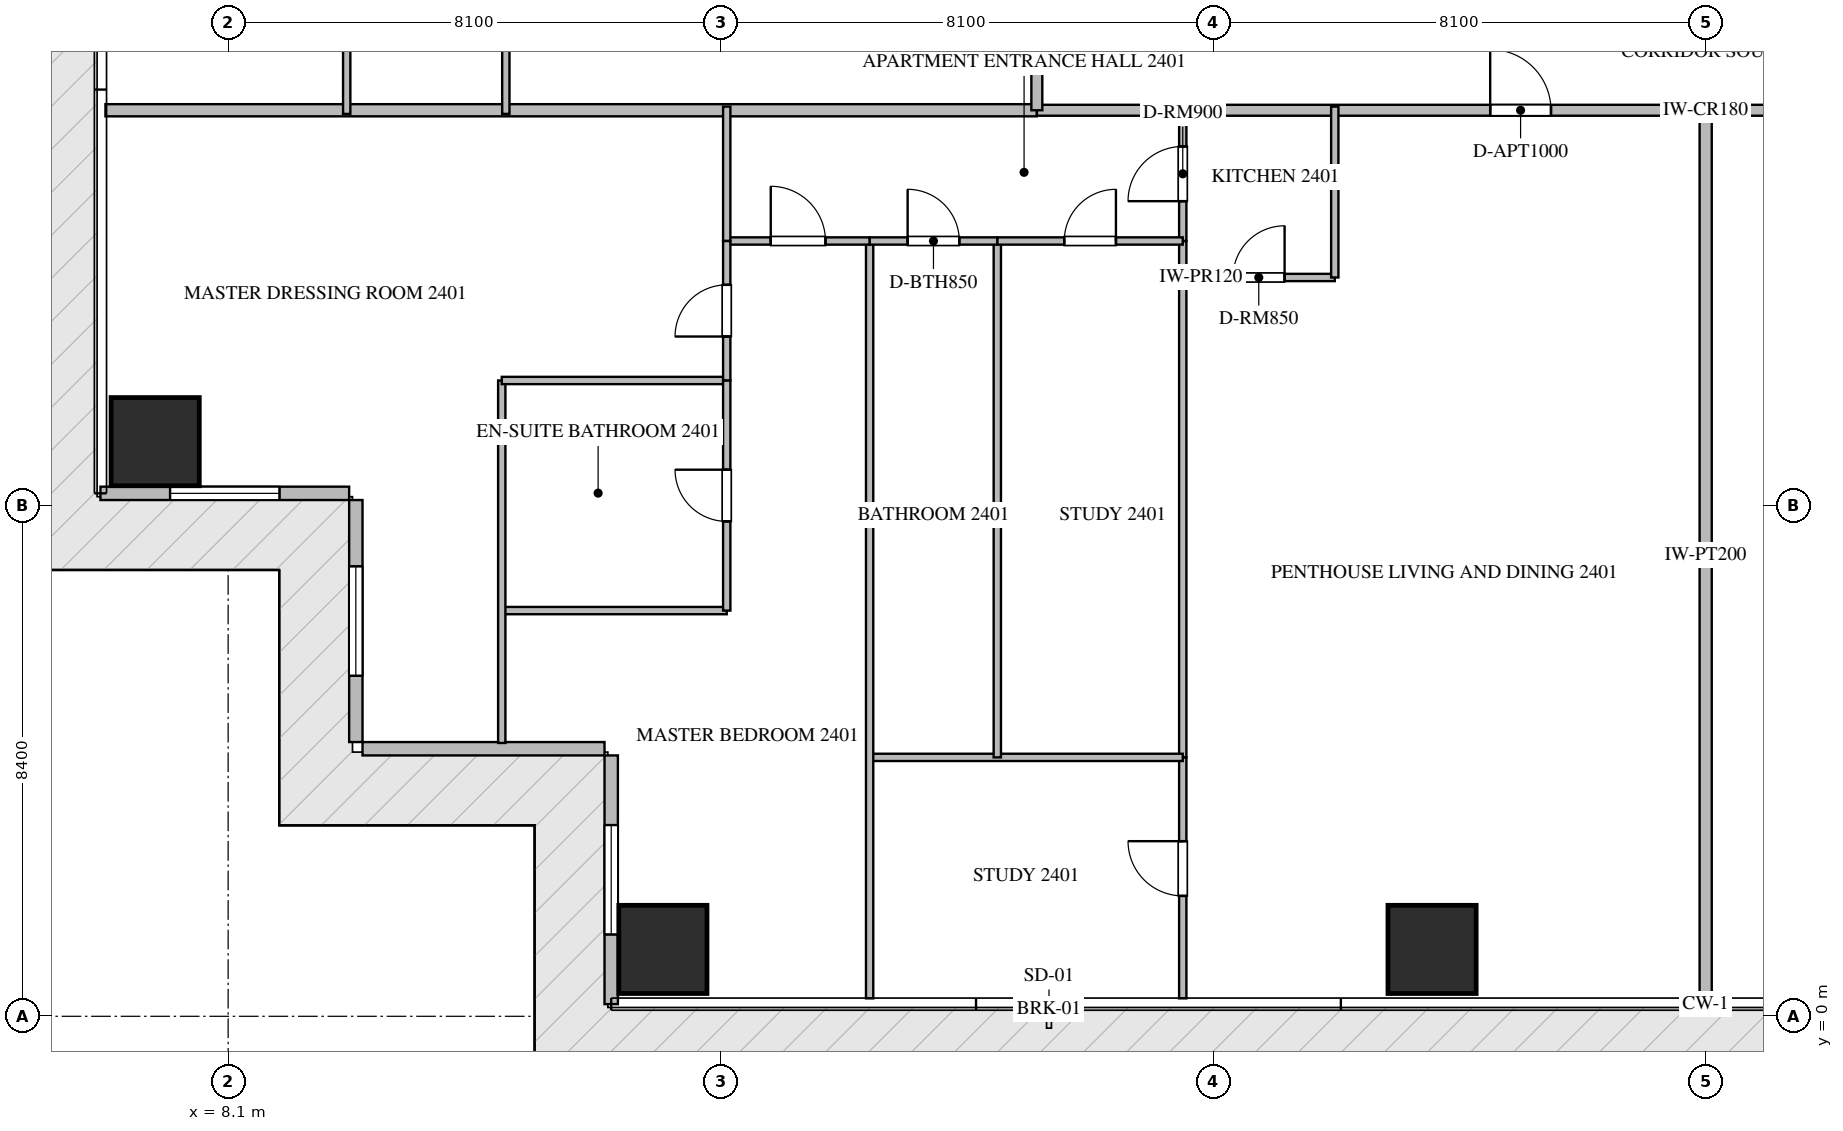
"""IFC4 building model, lengths in metres.
Left out: names, types, materials, properties, quantities, classifications, styles, units other than length and angle.
Written with IfcOpenShell. Run it as: python <this file> out.ifc"""

import sys

from ifc_helpers import new_model, si_unit, direction, frame, frame_2d, origin, origin_2d, place, context, subcontext, project, spatial, rectangle, extrude, source, transform, mapped, element, fill, save


model = new_model("IFC4")
c1 = context("Model", 3, precision=1e-05, world=origin(), true_north=direction((0.0, 1.0)))
c2 = subcontext(c1, "Body", "Model", "MODEL_VIEW")
j1 = project(units=[si_unit("LENGTHUNIT", "METRE"), si_unit("PLANEANGLEUNIT", "RADIAN")], contexts=[c1])
p1 = place(None, origin())
s1 = spatial("IfcSite", under=j1, at=p1, CompositionType="ELEMENT")
p2 = place(p1, origin())
s2 = spatial("IfcBuilding", under=s1, at=p2, CompositionType="ELEMENT")
p3 = place(p2, frame((0.0, 0.0, 97.95)))
s3 = spatial("IfcBuildingStorey", under=s2, at=p3, CompositionType="ELEMENT", Elevation=97.95)
m1 = source(origin(), c2, "Body", "SweptSolid", [
    extrude(rectangle(XDim=1.45, YDim=1.45, at=origin_2d()), origin(), (0.0, 0.0, 1.0), 3.75),
])
for number, where, z_axis, x_axis in (
    (1, (15.25, 1.1, -0.26), (0.0, 0.0, 1.0), (1.0, 0.0, 0.0)),
    (2, (27.9, 1.1, -0.26), (0.0, 0.0, 1.0), (1.0, 0.0, 0.0)),
    (3, (6.9, 9.45, -0.26), (0.0, 0.0, 1.0), (1.0, 0.0, 0.0)),
):
    element("IfcColumn", number, at=place(p3, frame(where, z_axis=z_axis, x_axis=x_axis)), inside=s3, PredefinedType="COLUMN", context=c2, shape_type="MappedRepresentation", body=[
        mapped(m1, transform((0.0, 0.0, 0.0), scale=1.0)),
    ])
p4 = place(p3, frame((6.0, 8.6, 0.0), z_axis=(0.0, 0.0, 1.0), x_axis=(1.0, 0.0, 0.0)))
e4 = element("IfcWall", 4, at=p4, inside=s3, PredefinedType="ELEMENTEDWALL", context=c2, shape_type="SweptSolid", body=[
    extrude(rectangle(XDim=4.09, YDim=0.22, at=frame_2d((2.045, 0.0))), origin(), (0.0, 0.0, 1.0), 3.475),
])
p5 = place(p4, frame((1.145, 0.0, 0.65)))
e5 = element("IfcOpeningElement", 5, at=p5, cuts=e4, PredefinedType="OPENING", context=c2, shape_type="SweptSolid", body=[
    extrude(rectangle(XDim=1.8, YDim=2.1, at=frame_2d((0.9, 1.05))), frame((0.0, 0.12, 0.0), z_axis=(0.0, -1.0, 0.0), x_axis=(1.0, 0.0, 0.0)), (0.0, 0.0, 1.0), 0.24),
])
p6 = place(p3, frame((10.2, 8.49, 0.0), z_axis=(0.0, 0.0, 1.0), x_axis=(0.0, -1.0, 0.0)))
e6 = element("IfcWall", 6, at=p6, inside=s3, PredefinedType="ELEMENTEDWALL", context=c2, shape_type="SweptSolid", body=[
    extrude(rectangle(XDim=3.98, YDim=0.22, at=frame_2d((1.99, 0.0))), origin(), (0.0, 0.0, 1.0), 3.475),
])
p7 = place(p6, frame((1.09, 0.0, 0.65)))
e7 = element("IfcOpeningElement", 7, at=p7, cuts=e6, PredefinedType="OPENING", context=c2, shape_type="SweptSolid", body=[
    extrude(rectangle(XDim=1.8, YDim=2.1, at=frame_2d((0.9, 1.05))), frame((0.0, 0.12, 0.0), z_axis=(0.0, -1.0, 0.0), x_axis=(1.0, 0.0, 0.0)), (0.0, 0.0, 1.0), 0.24),
])
p8 = place(p3, frame((10.31, 4.4, 0.0), z_axis=(0.0, 0.0, 1.0), x_axis=(1.0, 0.0, 0.0)))
e8 = element("IfcWall", 8, at=p8, inside=s3, PredefinedType="ELEMENTEDWALL", context=c2, shape_type="SweptSolid", body=[
    extrude(rectangle(XDim=3.98, YDim=0.22, at=frame_2d((1.99, 0.0))), origin(), (0.0, 0.0, 1.0), 3.475),
])
p9 = place(p3, frame((14.4, 4.29, 0.0), z_axis=(0.0, 0.0, 1.0), x_axis=(0.0, -1.0, 0.0)))
e9 = element("IfcWall", 9, at=p9, inside=s3, PredefinedType="ELEMENTEDWALL", context=c2, shape_type="SweptSolid", body=[
    extrude(rectangle(XDim=4.09, YDim=0.22, at=frame_2d((2.045, 0.0))), origin(), (0.0, 0.0, 1.0), 3.475),
])
p10 = place(p9, frame((1.145, 0.0, 0.65)))
e10 = element("IfcOpeningElement", 10, at=p10, cuts=e9, PredefinedType="OPENING", context=c2, shape_type="SweptSolid", body=[
    extrude(rectangle(XDim=1.8, YDim=2.1, at=frame_2d((0.9, 1.05))), frame((0.0, 0.12, 0.0), z_axis=(0.0, -1.0, 0.0), x_axis=(1.0, 0.0, 0.0)), (0.0, 0.0, 1.0), 0.24),
])
p11 = place(p3, frame((32.4, 0.282, 0.0), z_axis=(0.0, 0.0, 1.0), x_axis=(0.0, 1.0, 0.0)))
e11 = element("IfcWall", 11, at=p11, inside=s3, PredefinedType="PARTITIONING", context=c2, shape_type="SweptSolid", body=[
    extrude(rectangle(XDim=14.618, YDim=0.2, at=frame_2d((7.309, 0.0))), origin(), (0.0, 0.0, 1.0), 3.49),
])
p12 = place(p3, frame((6.082, 14.9, 0.0), z_axis=(0.0, 0.0, 1.0), x_axis=(1.0, 0.0, 0.0)))
e12 = element("IfcWall", 12, at=p12, inside=s3, PredefinedType="PARTITIONING", context=c2, shape_type="SweptSolid", body=[
    extrude(rectangle(XDim=15.318, YDim=0.2, at=frame_2d((7.659, 0.0))), origin(), (0.0, 0.0, 1.0), 3.49),
])
p13 = place(p3, frame((21.402, 14.9, 0.0), z_axis=(0.0, 0.0, 1.0), x_axis=(1.0, 0.0, 0.0)))
e13 = element("IfcWall", 13, at=p13, inside=s3, PredefinedType="PARTITIONING", context=c2, shape_type="SweptSolid", body=[
    extrude(rectangle(XDim=21.996, YDim=0.18, at=frame_2d((10.998, 0.0))), origin(), (0.0, 0.0, 1.0), 3.49),
])
p14 = place(p13, frame((7.454, 0.0, 0.0)))
e14 = element("IfcOpeningElement", 14, at=p14, cuts=e13, PredefinedType="OPENING", context=c2, shape_type="SweptSolid", body=[
    extrude(rectangle(XDim=1.0, YDim=2.15, at=frame_2d((0.5, 1.075))), frame((0.0, 0.1, 0.0), z_axis=(0.0, -1.0, 0.0), x_axis=(1.0, 0.0, 0.0)), (0.0, 0.0, 1.0), 0.2),
])
p15 = place(p13, frame((13.542, 0.0, 0.0)))
e15 = element("IfcOpeningElement", 15, at=p15, cuts=e13, PredefinedType="OPENING", context=c2, shape_type="SweptSolid", body=[
    extrude(rectangle(XDim=1.0, YDim=2.15, at=frame_2d((0.5, 1.075))), frame((0.0, 0.1, 0.0), z_axis=(0.0, -1.0, 0.0), x_axis=(1.0, 0.0, 0.0)), (0.0, 0.0, 1.0), 0.2),
])
p16 = place(p3, frame((21.4, 14.9, 0.0), z_axis=(0.0, 0.0, 1.0), x_axis=(0.0, 1.0, 0.0)))
e16 = element("IfcWall", 16, at=p16, inside=s3, PredefinedType="PARTITIONING", context=c2, shape_type="SweptSolid", body=[
    extrude(rectangle(XDim=20.6, YDim=0.18, at=frame_2d((10.3, 0.0))), origin(), (0.0, 0.0, 1.0), 3.49),
])
p17 = place(p16, frame((17.64, 0.0, 0.0)))
e17 = element("IfcOpeningElement", 17, at=p17, cuts=e16, PredefinedType="OPENING", context=c2, shape_type="SweptSolid", body=[
    extrude(rectangle(XDim=1.0, YDim=2.15, at=frame_2d((0.5, 1.075))), frame((0.0, 0.1, 0.0), z_axis=(0.0, -1.0, 0.0), x_axis=(1.0, 0.0, 0.0)), (0.0, 0.0, 1.0), 0.2),
])
p18 = place(p3, frame((23.8, 12.15, 0.0), z_axis=(0.0, 0.0, 1.0), x_axis=(1.0, 0.0, 0.0)))
e18 = element("IfcWall", 18, at=p18, inside=s3, PredefinedType="PARTITIONING", context=c2, shape_type="SweptSolid", body=[
    extrude(rectangle(XDim=2.5, YDim=0.12, at=frame_2d((1.25, 0.0))), origin(), (0.0, 0.0, 1.0), 3.49),
])
p19 = place(p18, frame((0.825, 0.0, 0.0)))
e19 = element("IfcOpeningElement", 19, at=p19, cuts=e18, PredefinedType="OPENING", context=c2, shape_type="SweptSolid", body=[
    extrude(rectangle(XDim=0.85, YDim=2.1, at=frame_2d((0.425, 1.05))), frame((0.0, 0.07, 0.0), z_axis=(0.0, -1.0, 0.0), x_axis=(1.0, 0.0, 0.0)), (0.0, 0.0, 1.0), 0.14),
])
p20 = place(p3, frame((26.3, 12.15, 0.0), z_axis=(0.0, 0.0, 1.0), x_axis=(0.0, 1.0, 0.0)))
e20 = element("IfcWall", 20, at=p20, inside=s3, PredefinedType="PARTITIONING", context=c2, shape_type="SweptSolid", body=[
    extrude(rectangle(XDim=2.81, YDim=0.12, at=frame_2d((1.405, 0.0))), origin(), (0.0, 0.0, 1.0), 3.49),
])
p21 = place(p3, frame((23.8, 12.75, 0.0), z_axis=(0.0, 0.0, 1.0), x_axis=(0.0, 1.0, 0.0)))
e21 = element("IfcWall", 21, at=p21, inside=s3, PredefinedType="PARTITIONING", context=c2, shape_type="SweptSolid", body=[
    extrude(rectangle(XDim=2.21, YDim=0.12, at=frame_2d((1.105, 0.0))), origin(), (0.0, 0.0, 1.0), 3.49),
])
p22 = place(p21, frame((0.655, 0.0, 0.0)))
e22 = element("IfcOpeningElement", 22, at=p22, cuts=e21, PredefinedType="OPENING", context=c2, shape_type="SweptSolid", body=[
    extrude(rectangle(XDim=0.9, YDim=2.1, at=frame_2d((0.45, 1.05))), frame((0.0, 0.07, 0.0), z_axis=(0.0, -1.0, 0.0), x_axis=(1.0, 0.0, 0.0)), (0.0, 0.0, 1.0), 0.14),
])
p23 = place(p3, frame((23.8, 0.295, 0.0), z_axis=(0.0, 0.0, 1.0), x_axis=(0.0, 1.0, 0.0)))
e23 = element("IfcWall", 23, at=p23, inside=s3, PredefinedType="PARTITIONING", context=c2, shape_type="SweptSolid", body=[
    extrude(rectangle(XDim=3.963, YDim=0.12, at=frame_2d((1.981, 0.0))), origin(), (0.0, 0.0, 1.0), 3.49),
])
p24 = place(p23, frame((1.685, 0.0, 0.0)))
e24 = element("IfcOpeningElement", 24, at=p24, cuts=e23, PredefinedType="OPENING", context=c2, shape_type="SweptSolid", body=[
    extrude(rectangle(XDim=0.9, YDim=2.1, at=frame_2d((0.45, 1.05))), frame((0.0, 0.07, 0.0), z_axis=(0.0, -1.0, 0.0), x_axis=(1.0, 0.0, 0.0)), (0.0, 0.0, 1.0), 0.14),
])
p25 = place(p3, frame((23.8, 4.26, 0.0), z_axis=(0.0, 0.0, 1.0), x_axis=(0.0, 1.0, 0.0)))
e25 = element("IfcWall", 25, at=p25, inside=s3, PredefinedType="PARTITIONING", context=c2, shape_type="SweptSolid", body=[
    extrude(rectangle(XDim=8.488, YDim=0.12, at=frame_2d((4.244, 0.0))), origin(), (0.0, 0.0, 1.0), 3.49),
])
p26 = place(p3, frame((18.65, 4.258, 0.0), z_axis=(0.0, 0.0, 1.0), x_axis=(1.0, 0.0, 0.0)))
e26 = element("IfcWall", 26, at=p26, inside=s3, PredefinedType="PARTITIONING", context=c2, shape_type="SweptSolid", body=[
    extrude(rectangle(XDim=5.15, YDim=0.12, at=frame_2d((2.575, 0.0))), origin(), (0.0, 0.0, 1.0), 3.49),
])
p27 = place(p3, frame((18.65, 0.295, 0.0), z_axis=(0.0, 0.0, 1.0), x_axis=(0.0, 1.0, 0.0)))
e27 = element("IfcWall", 27, at=p27, inside=s3, PredefinedType="PARTITIONING", context=c2, shape_type="SweptSolid", body=[
    extrude(rectangle(XDim=12.455, YDim=0.12, at=frame_2d((6.228, 0.0))), origin(), (0.0, 0.0, 1.0), 3.49),
])
p28 = place(p3, frame((20.75, 4.258, 0.0), z_axis=(0.0, 0.0, 1.0), x_axis=(0.0, 1.0, 0.0)))
e28 = element("IfcWall", 28, at=p28, inside=s3, PredefinedType="PARTITIONING", context=c2, shape_type="SweptSolid", body=[
    extrude(rectangle(XDim=8.492, YDim=0.12, at=frame_2d((4.246, 0.0))), origin(), (0.0, 0.0, 1.0), 3.49),
])
p29 = place(p3, frame((18.65, 12.75, 0.0), z_axis=(0.0, 0.0, 1.0), x_axis=(1.0, 0.0, 0.0)))
e29 = element("IfcWall", 29, at=p29, inside=s3, PredefinedType="PARTITIONING", context=c2, shape_type="SweptSolid", body=[
    extrude(rectangle(XDim=2.1, YDim=0.12, at=frame_2d((1.05, 0.0))), origin(), (0.0, 0.0, 1.0), 3.49),
])
p30 = place(p29, frame((0.625, 0.0, 0.0)))
e30 = element("IfcOpeningElement", 30, at=p30, cuts=e29, PredefinedType="OPENING", context=c2, shape_type="SweptSolid", body=[
    extrude(rectangle(XDim=0.85, YDim=2.1, at=frame_2d((0.425, 1.05))), frame((0.0, 0.07, 0.0), z_axis=(0.0, -1.0, 0.0), x_axis=(1.0, 0.0, 0.0)), (0.0, 0.0, 1.0), 0.14),
])
p31 = place(p3, frame((20.752, 12.75, 0.0), z_axis=(0.0, 0.0, 1.0), x_axis=(1.0, 0.0, 0.0)))
e31 = element("IfcWall", 31, at=p31, inside=s3, PredefinedType="PARTITIONING", context=c2, shape_type="SweptSolid", body=[
    extrude(rectangle(XDim=3.048, YDim=0.12, at=frame_2d((1.524, 0.0))), origin(), (0.0, 0.0, 1.0), 3.49),
])
p32 = place(p31, frame((1.099, 0.0, 0.0)))
e32 = element("IfcOpeningElement", 32, at=p32, cuts=e31, PredefinedType="OPENING", context=c2, shape_type="SweptSolid", body=[
    extrude(rectangle(XDim=0.85, YDim=2.1, at=frame_2d((0.425, 1.05))), frame((0.0, 0.07, 0.0), z_axis=(0.0, -1.0, 0.0), x_axis=(1.0, 0.0, 0.0)), (0.0, 0.0, 1.0), 0.14),
])
p33 = place(p3, frame((16.3, 12.75, 0.0), z_axis=(0.0, 0.0, 1.0), x_axis=(1.0, 0.0, 0.0)))
e33 = element("IfcWall", 33, at=p33, inside=s3, PredefinedType="PARTITIONING", context=c2, shape_type="SweptSolid", body=[
    extrude(rectangle(XDim=2.348, YDim=0.12, at=frame_2d((1.174, 0.0))), origin(), (0.0, 0.0, 1.0), 3.49),
])
p34 = place(p33, frame((0.724, 0.0, 0.0)))
e34 = element("IfcOpeningElement", 34, at=p34, cuts=e33, PredefinedType="OPENING", context=c2, shape_type="SweptSolid", body=[
    extrude(rectangle(XDim=0.9, YDim=2.1, at=frame_2d((0.45, 1.05))), frame((0.0, 0.07, 0.0), z_axis=(0.0, -1.0, 0.0), x_axis=(1.0, 0.0, 0.0)), (0.0, 0.0, 1.0), 0.14),
])
p35 = place(p3, frame((12.6, 6.672, 0.0), z_axis=(0.0, 0.0, 1.0), x_axis=(1.0, 0.0, 0.0)))
e35 = element("IfcWall", 35, at=p35, inside=s3, PredefinedType="PARTITIONING", context=c2, shape_type="SweptSolid", body=[
    extrude(rectangle(XDim=3.7, YDim=0.12, at=frame_2d((1.85, 0.0))), origin(), (0.0, 0.0, 1.0), 3.49),
])
p36 = place(p3, frame((12.6, 4.495, 0.0), z_axis=(0.0, 0.0, 1.0), x_axis=(0.0, 1.0, 0.0)))
e36 = element("IfcWall", 36, at=p36, inside=s3, PredefinedType="PARTITIONING", context=c2, shape_type="SweptSolid", body=[
    extrude(rectangle(XDim=5.961, YDim=0.12, at=frame_2d((2.98, 0.0))), origin(), (0.0, 0.0, 1.0), 3.49),
])
p37 = place(p3, frame((12.6, 10.456, 0.0), z_axis=(0.0, 0.0, 1.0), x_axis=(1.0, 0.0, 0.0)))
e37 = element("IfcWall", 37, at=p37, inside=s3, PredefinedType="PARTITIONING", context=c2, shape_type="SweptSolid", body=[
    extrude(rectangle(XDim=3.7, YDim=0.12, at=frame_2d((1.85, 0.0))), origin(), (0.0, 0.0, 1.0), 3.49),
])
p38 = place(p3, frame((16.3, 6.672, 0.0), z_axis=(0.0, 0.0, 1.0), x_axis=(0.0, 1.0, 0.0)))
e38 = element("IfcWall", 38, at=p38, inside=s3, PredefinedType="PARTITIONING", context=c2, shape_type="SweptSolid", body=[
    extrude(rectangle(XDim=3.784, YDim=0.12, at=frame_2d((1.892, 0.0))), origin(), (0.0, 0.0, 1.0), 3.49),
])
p39 = place(p38, frame((1.467, 0.0, 0.0)))
e39 = element("IfcOpeningElement", 39, at=p39, cuts=e38, PredefinedType="OPENING", context=c2, shape_type="SweptSolid", body=[
    extrude(rectangle(XDim=0.85, YDim=2.1, at=frame_2d((0.425, 1.05))), frame((0.0, 0.07, 0.0), z_axis=(0.0, -1.0, 0.0), x_axis=(1.0, 0.0, 0.0)), (0.0, 0.0, 1.0), 0.14),
])
p40 = place(p3, frame((16.3, 10.458, 0.0), z_axis=(0.0, 0.0, 1.0), x_axis=(0.0, 1.0, 0.0)))
e40 = element("IfcWall", 40, at=p40, inside=s3, PredefinedType="PARTITIONING", context=c2, shape_type="SweptSolid", body=[
    extrude(rectangle(XDim=2.292, YDim=0.12, at=frame_2d((1.146, 0.0))), origin(), (0.0, 0.0, 1.0), 3.49),
])
p41 = place(p40, frame((0.721, 0.0, 0.0)))
e41 = element("IfcOpeningElement", 41, at=p41, cuts=e40, PredefinedType="OPENING", context=c2, shape_type="SweptSolid", body=[
    extrude(rectangle(XDim=0.85, YDim=2.1, at=frame_2d((0.425, 1.05))), frame((0.0, 0.07, 0.0), z_axis=(0.0, -1.0, 0.0), x_axis=(1.0, 0.0, 0.0)), (0.0, 0.0, 1.0), 0.14),
])
p42 = place(p3, frame((16.3, 12.752, 0.0), z_axis=(0.0, 0.0, 1.0), x_axis=(0.0, 1.0, 0.0)))
e42 = element("IfcWall", 42, at=p42, inside=s3, PredefinedType="PARTITIONING", context=c2, shape_type="SweptSolid", body=[
    extrude(rectangle(XDim=2.208, YDim=0.12, at=frame_2d((1.104, 0.0))), origin(), (0.0, 0.0, 1.0), 3.49),
])
for number, where, z_axis, x_axis in (
    (43, (10.05, 14.84, 0.0), (0.0, 0.0, 1.0), (0.0, 1.0, 0.0)),
    (44, (12.667, 14.84, 0.0), (0.0, 0.0, 1.0), (0.0, 1.0, 0.0)),
):
    element("IfcWall", number, at=place(p3, frame(where, z_axis=z_axis, x_axis=x_axis)), inside=s3, PredefinedType="PARTITIONING", context=c2, shape_type="SweptSolid", body=[
        extrude(rectangle(XDim=5.41, YDim=0.12, at=frame_2d((2.705, 0.0))), origin(), (0.0, 0.0, 1.0), 3.49),
    ])
m2 = source(origin(), c2, "Body", "SweptSolid", [
    extrude(rectangle(XDim=1.8, YDim=2.1, at=frame_2d((0.9, 1.05))), frame((0.0, 0.03, 0.0), z_axis=(0.0, -1.0, 0.0), x_axis=(1.0, 0.0, 0.0)), (0.0, 0.0, 1.0), 0.06),
])
p43 = place(p5, origin())
e45 = element("IfcWindow", 45, at=p43, inside=s3, PartitioningType="SINGLE_PANEL", PredefinedType="WINDOW", context=c2, shape_type="MappedRepresentation", body=[
    mapped(m2, transform((0.0, 0.0, 0.0), scale=1.0)),
])
fill(e5, e45)
p44 = place(p7, origin())
e46 = element("IfcWindow", 46, at=p44, inside=s3, PartitioningType="SINGLE_PANEL", PredefinedType="WINDOW", context=c2, shape_type="MappedRepresentation", body=[
    mapped(m2, transform((0.0, 0.0, 0.0), scale=1.0)),
])
fill(e7, e46)
p45 = place(p10, origin())
e47 = element("IfcWindow", 47, at=p45, inside=s3, PartitioningType="SINGLE_PANEL", PredefinedType="WINDOW", context=c2, shape_type="MappedRepresentation", body=[
    mapped(m2, transform((0.0, 0.0, 0.0), scale=1.0)),
])
fill(e10, e47)
m3 = source(origin(), c2, "Body", "SweptSolid", [
    extrude(rectangle(XDim=1.0, YDim=2.15, at=frame_2d((0.5, 1.075))), frame((0.0, 0.025, 0.0), z_axis=(0.0, -1.0, 0.0), x_axis=(1.0, 0.0, 0.0)), (0.0, 0.0, 1.0), 0.05),
])
p46 = place(p14, origin())
e48 = element("IfcDoor", 48, at=p46, inside=s3, OperationType="SINGLE_SWING_LEFT", PredefinedType="DOOR", context=c2, shape_type="MappedRepresentation", body=[
    mapped(m3, transform((0.0, 0.0, 0.0), scale=1.0)),
])
fill(e14, e48)
m4 = source(origin(), c2, "Body", "SweptSolid", [
    extrude(rectangle(XDim=0.85, YDim=2.1, at=frame_2d((0.425, 1.05))), frame((0.0, 0.025, 0.0), z_axis=(0.0, -1.0, 0.0), x_axis=(1.0, 0.0, 0.0)), (0.0, 0.0, 1.0), 0.05),
])
p47 = place(p19, origin())
e49 = element("IfcDoor", 49, at=p47, inside=s3, OperationType="SINGLE_SWING_RIGHT", PredefinedType="DOOR", context=c2, shape_type="MappedRepresentation", body=[
    mapped(m4, transform((0.0, 0.0, 0.0), scale=1.0)),
])
fill(e19, e49)
m5 = source(origin(), c2, "Body", "SweptSolid", [
    extrude(rectangle(XDim=0.9, YDim=2.1, at=frame_2d((0.45, 1.05))), frame((0.0, 0.025, 0.0), z_axis=(0.0, -1.0, 0.0), x_axis=(1.0, 0.0, 0.0)), (0.0, 0.0, 1.0), 0.05),
])
p48 = place(p22, origin())
e50 = element("IfcDoor", 50, at=p48, inside=s3, OperationType="SINGLE_SWING_LEFT", PredefinedType="DOOR", context=c2, shape_type="MappedRepresentation", body=[
    mapped(m5, transform((0.0, 0.0, 0.0), scale=1.0)),
])
fill(e22, e50)
p49 = place(p24, origin())
e51 = element("IfcDoor", 51, at=p49, inside=s3, OperationType="SINGLE_SWING_RIGHT", PredefinedType="DOOR", context=c2, shape_type="MappedRepresentation", body=[
    mapped(m5, transform((0.0, 0.0, 0.0), scale=1.0)),
])
fill(e24, e51)
p50 = place(p30, origin())
e52 = element("IfcDoor", 52, at=p50, inside=s3, OperationType="SINGLE_SWING_LEFT", PredefinedType="DOOR", context=c2, shape_type="MappedRepresentation", body=[
    mapped(m4, transform((0.0, 0.0, 0.0), scale=1.0)),
])
fill(e30, e52)
p51 = place(p32, origin())
e53 = element("IfcDoor", 53, at=p51, inside=s3, OperationType="SINGLE_SWING_RIGHT", PredefinedType="DOOR", context=c2, shape_type="MappedRepresentation", body=[
    mapped(m4, transform((0.0, 0.0, 0.0), scale=1.0)),
])
fill(e32, e53)
p52 = place(p34, origin())
e54 = element("IfcDoor", 54, at=p52, inside=s3, OperationType="SINGLE_SWING_LEFT", PredefinedType="DOOR", context=c2, shape_type="MappedRepresentation", body=[
    mapped(m5, transform((0.0, 0.0, 0.0), scale=1.0)),
])
fill(e34, e54)
p53 = place(p39, origin())
e55 = element("IfcDoor", 55, at=p53, inside=s3, OperationType="SINGLE_SWING_RIGHT", PredefinedType="DOOR", context=c2, shape_type="MappedRepresentation", body=[
    mapped(m4, transform((0.0, 0.0, 0.0), scale=1.0)),
])
fill(e39, e55)
p54 = place(p41, origin())
e56 = element("IfcDoor", 56, at=p54, inside=s3, OperationType="SINGLE_SWING_LEFT", PredefinedType="DOOR", context=c2, shape_type="MappedRepresentation", body=[
    mapped(m4, transform((0.0, 0.0, 0.0), scale=1.0)),
])
fill(e41, e56)
save(model, sys.argv[1])
